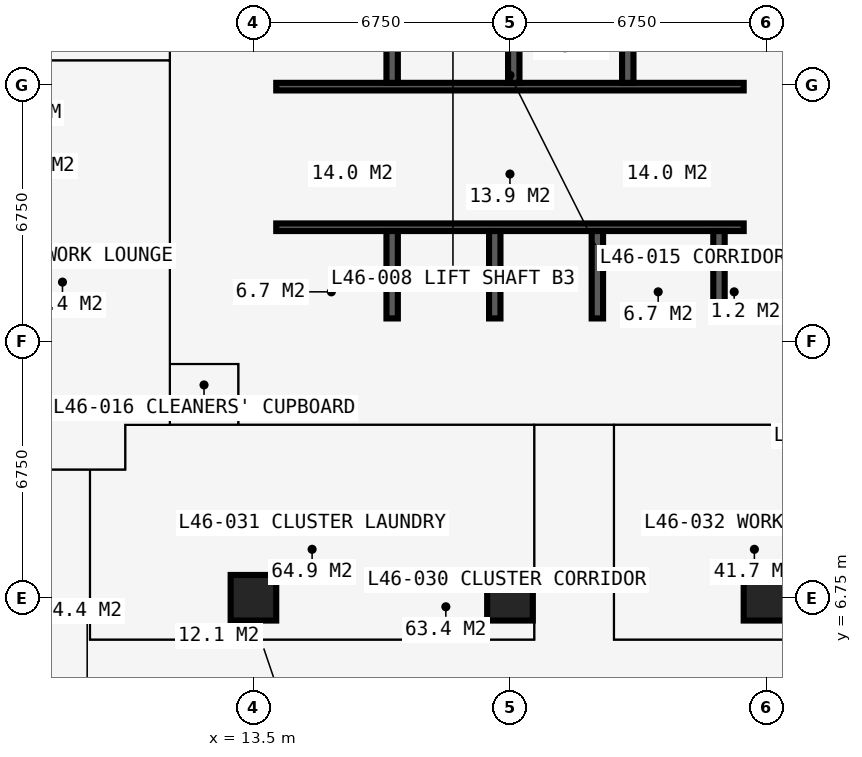
"""IFC4 building model, lengths in metres.
Left out: names, types, materials, properties, quantities, classifications, styles, units other than length and angle.
Written with IfcOpenShell. Run it as: python <this file> out.ifc"""

import sys

from ifc_helpers import new_model, si_unit, direction, frame, frame_2d, origin, origin_2d, place, context, subcontext, project, spatial, rectangle, extrude, element, fill, save


model = new_model("IFC4")
c1 = context("Model", 3, precision=1e-05, world=origin(), true_north=direction((0.0, 1.0)))
c2 = subcontext(c1, "Body", "Model", "MODEL_VIEW")
j1 = project(units=[si_unit("LENGTHUNIT", "METRE"), si_unit("PLANEANGLEUNIT", "RADIAN")], contexts=[c1])
p1 = place(None, origin())
s1 = spatial("IfcSite", under=j1, at=p1, CompositionType="ELEMENT")
p2 = place(p1, origin())
s2 = spatial("IfcBuilding", under=s1, at=p2, CompositionType="ELEMENT")
p3 = place(p2, frame((0.0, 0.0, 171.0)))
s3 = spatial("IfcBuildingStorey", under=s2, at=p3, CompositionType="ELEMENT", Elevation=171.0)
for number, where, z_axis, x_axis in (
    (1, (13.5, 6.75, 0.0), (0.0, 0.0, 1.0), (1.0, 0.0, 0.0)),
    (2, (20.25, 6.75, 0.0), (0.0, 0.0, 1.0), (1.0, 0.0, 0.0)),
    (3, (27.0, 6.75, 0.0), (0.0, 0.0, 1.0), (1.0, 0.0, 0.0)),
):
    element("IfcColumn", number, at=place(p3, frame(where, z_axis=z_axis, x_axis=x_axis)), inside=s3, PredefinedType="COLUMN", context=c2, shape_type="SweptSolid", body=[
        extrude(rectangle(XDim=1.2, YDim=1.2, at=origin_2d()), origin(), (0.0, 0.0, 1.0), 3.6),
    ])
p4 = place(p3, frame((13.1, 13.5, 0.0), z_axis=(0.0, 0.0, 1.0), x_axis=(1.0, 0.0, 0.0)))
e4 = element("IfcWall", 4, at=p4, inside=s3, PredefinedType="SHEAR", context=c2, shape_type="SweptSolid", body=[
    extrude(rectangle(XDim=14.3, YDim=1.2, at=frame_2d((7.15, 0.0))), origin(), (0.0, 0.0, 1.0), 3.6),
])
p5 = place(p3, frame((26.9, 14.1, 0.0), z_axis=(0.0, 0.0, 1.0), x_axis=(0.0, 1.0, 0.0)))
e5 = element("IfcWall", 5, at=p5, inside=s3, PredefinedType="SHEAR", context=c2, shape_type="SweptSolid", body=[
    extrude(rectangle(XDim=12.3, YDim=1.0, at=frame_2d((6.15, 0.0))), origin(), (0.0, 0.0, 1.0), 3.6),
])
p6 = place(p5, frame((3.65, 0.0, 0.0)))
e6 = element("IfcOpeningElement", 6, at=p6, cuts=e5, PredefinedType="OPENING", context=c2, shape_type="SweptSolid", body=[
    extrude(rectangle(XDim=1.2, YDim=2.2, at=frame_2d((0.6, 1.1))), frame((0.0, 0.51, 0.0), z_axis=(0.0, -1.0, 0.0), x_axis=(1.0, 0.0, 0.0)), (0.0, 0.0, 1.0), 1.02),
])
p7 = place(p3, frame((13.6, 26.4, 0.0), z_axis=(0.0, 0.0, 1.0), x_axis=(0.0, -1.0, 0.0)))
e7 = element("IfcWall", 7, at=p7, inside=s3, PredefinedType="SHEAR", context=c2, shape_type="SweptSolid", body=[
    extrude(rectangle(XDim=12.3, YDim=1.0, at=frame_2d((6.15, 0.0))), origin(), (0.0, 0.0, 1.0), 3.6),
])
p8 = place(p7, frame((7.45, 0.0, 0.0)))
e8 = element("IfcOpeningElement", 8, at=p8, cuts=e7, PredefinedType="OPENING", context=c2, shape_type="SweptSolid", body=[
    extrude(rectangle(XDim=1.2, YDim=2.2, at=frame_2d((0.6, 1.1))), frame((0.0, 0.51, 0.0), z_axis=(0.0, -1.0, 0.0), x_axis=(1.0, 0.0, 0.0)), (0.0, 0.0, 1.0), 1.02),
])
p9 = place(p3, frame((14.1, 16.5, 0.0), z_axis=(0.0, 0.0, 1.0), x_axis=(1.0, 0.0, 0.0)))
e9 = element("IfcWall", 9, at=p9, inside=s3, PredefinedType="SHEAR", context=c2, shape_type="SweptSolid", body=[
    extrude(rectangle(XDim=12.3, YDim=0.2, at=frame_2d((6.15, 0.0))), origin(), (0.0, 0.0, 1.0), 3.6),
])
p10 = place(p9, frame((0.9, 0.0, 0.0)))
e10 = element("IfcOpeningElement", 10, at=p10, cuts=e9, PredefinedType="OPENING", context=c2, shape_type="SweptSolid", body=[
    extrude(rectangle(XDim=1.1, YDim=2.2, at=frame_2d((0.55, 1.1))), frame((0.0, 0.11, 0.0), z_axis=(0.0, -1.0, 0.0), x_axis=(1.0, 0.0, 0.0)), (0.0, 0.0, 1.0), 0.22),
])
p11 = place(p9, frame((4.31, 0.0, 0.0)))
e11 = element("IfcOpeningElement", 11, at=p11, cuts=e9, PredefinedType="OPENING", context=c2, shape_type="SweptSolid", body=[
    extrude(rectangle(XDim=1.1, YDim=2.2, at=frame_2d((0.55, 1.1))), frame((0.0, 0.11, 0.0), z_axis=(0.0, -1.0, 0.0), x_axis=(1.0, 0.0, 0.0)), (0.0, 0.0, 1.0), 0.22),
])
p12 = place(p9, frame((6.45, 0.0, 0.0)))
e12 = element("IfcOpeningElement", 12, at=p12, cuts=e9, PredefinedType="OPENING", context=c2, shape_type="SweptSolid", body=[
    extrude(rectangle(XDim=1.1, YDim=2.2, at=frame_2d((0.55, 1.1))), frame((0.0, 0.11, 0.0), z_axis=(0.0, -1.0, 0.0), x_axis=(1.0, 0.0, 0.0)), (0.0, 0.0, 1.0), 0.22),
])
p13 = place(p9, frame((9.5, 0.0, 0.0)))
e13 = element("IfcOpeningElement", 13, at=p13, cuts=e9, PredefinedType="OPENING", context=c2, shape_type="SweptSolid", body=[
    extrude(rectangle(XDim=1.1, YDim=2.2, at=frame_2d((0.55, 1.1))), frame((0.0, 0.11, 0.0), z_axis=(0.0, -1.0, 0.0), x_axis=(1.0, 0.0, 0.0)), (0.0, 0.0, 1.0), 0.22),
])
p14 = place(p3, frame((14.1, 20.2, 0.0), z_axis=(0.0, 0.0, 1.0), x_axis=(1.0, 0.0, 0.0)))
e14 = element("IfcWall", 14, at=p14, inside=s3, PredefinedType="SHEAR", context=c2, shape_type="SweptSolid", body=[
    extrude(rectangle(XDim=12.3, YDim=0.2, at=frame_2d((6.15, 0.0))), origin(), (0.0, 0.0, 1.0), 3.6),
])
p15 = place(p14, frame((4.56, 0.0, 0.0)))
e15 = element("IfcOpeningElement", 15, at=p15, cuts=e14, PredefinedType="OPENING", context=c2, shape_type="SweptSolid", body=[
    extrude(rectangle(XDim=1.1, YDim=2.2, at=frame_2d((0.55, 1.1))), frame((0.0, 0.11, 0.0), z_axis=(0.0, -1.0, 0.0), x_axis=(1.0, 0.0, 0.0)), (0.0, 0.0, 1.0), 0.22),
])
p16 = place(p14, frame((6.7, 0.0, 0.0)))
e16 = element("IfcOpeningElement", 16, at=p16, cuts=e14, PredefinedType="OPENING", context=c2, shape_type="SweptSolid", body=[
    extrude(rectangle(XDim=1.1, YDim=2.2, at=frame_2d((0.55, 1.1))), frame((0.0, 0.11, 0.0), z_axis=(0.0, -1.0, 0.0), x_axis=(1.0, 0.0, 0.0)), (0.0, 0.0, 1.0), 0.22),
])
p17 = place(p14, frame((0.35, 0.0, 0.0)))
e17 = element("IfcOpeningElement", 17, at=p17, cuts=e14, PredefinedType="OPENING", context=c2, shape_type="SweptSolid", body=[
    extrude(rectangle(XDim=1.1, YDim=2.2, at=frame_2d((0.55, 1.1))), frame((0.0, 0.11, 0.0), z_axis=(0.0, -1.0, 0.0), x_axis=(1.0, 0.0, 0.0)), (0.0, 0.0, 1.0), 0.22),
])
p18 = place(p14, frame((9.75, 0.0, 0.0)))
e18 = element("IfcOpeningElement", 18, at=p18, cuts=e14, PredefinedType="OPENING", context=c2, shape_type="SweptSolid", body=[
    extrude(rectangle(XDim=1.1, YDim=2.2, at=frame_2d((0.55, 1.1))), frame((0.0, 0.11, 0.0), z_axis=(0.0, -1.0, 0.0), x_axis=(1.0, 0.0, 0.0)), (0.0, 0.0, 1.0), 0.22),
])
for number, where, z_axis, x_axis in (
    (19, (17.15, 20.3, 0.0), (0.0, 0.0, 1.0), (0.0, 1.0, 0.0)),
    (20, (23.35, 20.3, 0.0), (0.0, 0.0, 1.0), (0.0, 1.0, 0.0)),
):
    element("IfcWall", number, at=place(p3, frame(where, z_axis=z_axis, x_axis=x_axis)), inside=s3, PredefinedType="SHEAR", context=c2, shape_type="SweptSolid", body=[
        extrude(rectangle(XDim=6.1, YDim=0.3, at=frame_2d((3.05, 0.0))), origin(), (0.0, 0.0, 1.0), 3.6),
    ])
p19 = place(p3, frame((20.35, 20.3, 0.0), z_axis=(0.0, 0.0, 1.0), x_axis=(0.0, 1.0, 0.0)))
e21 = element("IfcWall", 21, at=p19, inside=s3, PredefinedType="SHEAR", context=c2, shape_type="SweptSolid", body=[
    extrude(rectangle(XDim=2.8, YDim=0.3, at=frame_2d((1.4, 0.0))), origin(), (0.0, 0.0, 1.0), 3.6),
])
for number, where, z_axis, x_axis in (
    (22, (17.15, 14.1, 0.0), (0.0, 0.0, 1.0), (0.0, 1.0, 0.0)),
    (23, (19.85, 14.1, 0.0), (0.0, 0.0, 1.0), (0.0, 1.0, 0.0)),
    (24, (22.55, 14.1, 0.0), (0.0, 0.0, 1.0), (0.0, 1.0, 0.0)),
    (25, (25.75, 14.1, 0.0), (0.0, 0.0, 1.0), (0.0, 1.0, 0.0)),
):
    element("IfcWall", number, at=place(p3, frame(where, z_axis=z_axis, x_axis=x_axis)), inside=s3, PredefinedType="SHEAR", context=c2, shape_type="SweptSolid", body=[
        extrude(rectangle(XDim=2.3, YDim=0.3, at=frame_2d((1.15, 0.0))), origin(), (0.0, 0.0, 1.0), 3.6),
    ])
p20 = place(p3, frame((18.185, 16.6, 0.0), z_axis=(0.0, 0.0, 1.0), x_axis=(0.0, 1.0, 0.0)))
e26 = element("IfcWall", 26, at=p20, inside=s3, PredefinedType="PARTITIONING", context=c2, shape_type="SweptSolid", body=[
    extrude(rectangle(XDim=3.5, YDim=0.15, at=frame_2d((1.75, 0.0))), origin(), (0.0, 0.0, 1.0), 3.375),
])
p21 = place(p20, frame((1.15, 0.0, 0.0)))
e27 = element("IfcOpeningElement", 27, at=p21, cuts=e26, PredefinedType="OPENING", context=c2, shape_type="SweptSolid", body=[
    extrude(rectangle(XDim=1.2, YDim=2.2, at=frame_2d((0.6, 1.1))), frame((0.0, 0.085, 0.0), z_axis=(0.0, -1.0, 0.0), x_axis=(1.0, 0.0, 0.0)), (0.0, 0.0, 1.0), 0.17),
])
p22 = place(p3, frame((22.315, 16.6, 0.0), z_axis=(0.0, 0.0, 1.0), x_axis=(0.0, 1.0, 0.0)))
e28 = element("IfcWall", 28, at=p22, inside=s3, PredefinedType="PARTITIONING", context=c2, shape_type="SweptSolid", body=[
    extrude(rectangle(XDim=3.5, YDim=0.15, at=frame_2d((1.75, 0.0))), origin(), (0.0, 0.0, 1.0), 3.375),
])
p23 = place(p22, frame((1.15, 0.0, 0.0)))
e29 = element("IfcOpeningElement", 29, at=p23, cuts=e28, PredefinedType="OPENING", context=c2, shape_type="SweptSolid", body=[
    extrude(rectangle(XDim=1.2, YDim=2.2, at=frame_2d((0.6, 1.1))), frame((0.0, 0.085, 0.0), z_axis=(0.0, -1.0, 0.0), x_axis=(1.0, 0.0, 0.0)), (0.0, 0.0, 1.0), 0.17),
])
p24 = place(p3, frame((-0.734, 10.125, 0.0), z_axis=(0.0, 0.0, 1.0), x_axis=(1.0, 0.0, 0.0)))
e30 = element("IfcWall", 30, at=p24, inside=s3, PredefinedType="PARTITIONING", context=c2, shape_type="SweptSolid", body=[
    extrude(rectangle(XDim=10.859, YDim=0.15, at=frame_2d((5.429, 0.0))), origin(), (0.0, 0.0, 1.0), 3.375),
])
p25 = place(p24, frame((8.234, 0.0, 0.0)))
e31 = element("IfcOpeningElement", 31, at=p25, cuts=e30, PredefinedType="OPENING", context=c2, shape_type="SweptSolid", body=[
    extrude(rectangle(XDim=0.95, YDim=2.2, at=frame_2d((0.475, 1.1))), frame((0.0, 0.085, 0.0), z_axis=(0.0, -1.0, 0.0), x_axis=(1.0, 0.0, 0.0)), (0.0, 0.0, 1.0), 0.17),
])
p26 = place(p3, frame((5.65, 20.887, 0.0), z_axis=(0.0, 0.0, 1.0), x_axis=(1.0, 0.0, 0.0)))
e32 = element("IfcWall", 32, at=p26, inside=s3, PredefinedType="PARTITIONING", context=c2, shape_type="SweptSolid", body=[
    extrude(rectangle(XDim=5.65, YDim=0.15, at=frame_2d((2.825, 0.0))), origin(), (0.0, 0.0, 1.0), 3.375),
])
p27 = place(p3, frame((9.2, 5.65, 0.0), z_axis=(0.0, 0.0, 1.0), x_axis=(0.0, 1.0, 0.0)))
e33 = element("IfcWall", 33, at=p27, inside=s3, PredefinedType="PARTITIONING", context=c2, shape_type="SweptSolid", body=[
    extrude(rectangle(XDim=4.475, YDim=0.15, at=frame_2d((2.238, 0.0))), origin(), (0.0, 0.0, 1.0), 3.375),
])
p28 = place(p3, frame((9.2, 5.65, 0.0), z_axis=(0.0, 0.0, 1.0), x_axis=(1.0, 0.0, 0.0)))
e34 = element("IfcWall", 34, at=p28, inside=s3, PredefinedType="PARTITIONING", context=c2, shape_type="SweptSolid", body=[
    extrude(rectangle(XDim=11.688, YDim=0.15, at=frame_2d((5.844, 0.0))), origin(), (0.0, 0.0, 1.0), 3.375),
])
p29 = place(p28, frame((5.35, 0.0, 0.0)))
e35 = element("IfcOpeningElement", 35, at=p29, cuts=e34, PredefinedType="OPENING", context=c2, shape_type="SweptSolid", body=[
    extrude(rectangle(XDim=0.95, YDim=2.2, at=frame_2d((0.475, 1.1))), frame((0.0, 0.085, 0.0), z_axis=(0.0, -1.0, 0.0), x_axis=(1.0, 0.0, 0.0)), (0.0, 0.0, 1.0), 0.17),
])
p30 = place(p3, frame((10.125, 10.125, 0.0), z_axis=(0.0, 0.0, 1.0), x_axis=(0.0, 1.0, 0.0)))
e36 = element("IfcWall", 36, at=p30, inside=s3, PredefinedType="PARTITIONING", context=c2, shape_type="SweptSolid", body=[
    extrude(rectangle(XDim=1.175, YDim=0.15, at=frame_2d((0.587, 0.0))), origin(), (0.0, 0.0, 1.0), 3.375),
])
p31 = place(p3, frame((10.125, 11.3, 0.0), z_axis=(0.0, 0.0, 1.0), x_axis=(1.0, 0.0, 0.0)))
e37 = element("IfcWall", 37, at=p31, inside=s3, PredefinedType="PARTITIONING", context=c2, shape_type="SweptSolid", body=[
    extrude(rectangle(XDim=21.475, YDim=0.15, at=frame_2d((10.738, 0.0))), origin(), (0.0, 0.0, 1.0), 3.375),
])
p32 = place(p31, frame((11.312, 0.0, 0.0)))
e38 = element("IfcOpeningElement", 38, at=p32, cuts=e37, PredefinedType="OPENING", context=c2, shape_type="SweptSolid", body=[
    extrude(rectangle(XDim=1.0, YDim=2.2, at=frame_2d((0.5, 1.1))), frame((0.0, 0.085, 0.0), z_axis=(0.0, -1.0, 0.0), x_axis=(1.0, 0.0, 0.0)), (0.0, 0.0, 1.0), 0.17),
])
p33 = place(p3, frame((11.3, 11.3, 0.0), z_axis=(0.0, 0.0, 1.0), x_axis=(0.0, 1.0, 0.0)))
e39 = element("IfcWall", 39, at=p33, inside=s3, PredefinedType="PARTITIONING", context=c2, shape_type="SweptSolid", body=[
    extrude(rectangle(XDim=19.075, YDim=0.15, at=frame_2d((9.538, 0.0))), origin(), (0.0, 0.0, 1.0), 3.375),
])
p34 = place(p33, frame((13.95, 0.0, 0.0)))
e40 = element("IfcOpeningElement", 40, at=p34, cuts=e39, PredefinedType="OPENING", context=c2, shape_type="SweptSolid", body=[
    extrude(rectangle(XDim=1.0, YDim=2.2, at=frame_2d((0.5, 1.1))), frame((0.0, 0.085, 0.0), z_axis=(0.0, -1.0, 0.0), x_axis=(1.0, 0.0, 0.0)), (0.0, 0.0, 1.0), 0.17),
])
p35 = place(p3, frame((11.3, 12.9, 0.0), z_axis=(0.0, 0.0, 1.0), x_axis=(1.0, 0.0, 0.0)))
e41 = element("IfcWall", 41, at=p35, inside=s3, PredefinedType="PARTITIONING", context=c2, shape_type="SweptSolid", body=[
    extrude(rectangle(XDim=1.8, YDim=0.15, at=frame_2d((0.9, 0.0))), origin(), (0.0, 0.0, 1.0), 2.806),
])
p36 = place(p35, frame((0.4, 0.0, 0.0)))
e42 = element("IfcOpeningElement", 42, at=p36, cuts=e41, PredefinedType="OPENING", context=c2, shape_type="SweptSolid", body=[
    extrude(rectangle(XDim=0.95, YDim=2.2, at=frame_2d((0.475, 1.1))), frame((0.0, 0.085, 0.0), z_axis=(0.0, -1.0, 0.0), x_axis=(1.0, 0.0, 0.0)), (0.0, 0.0, 1.0), 0.17),
])
p37 = place(p3, frame((13.1, 11.3, 0.0), z_axis=(0.0, 0.0, 1.0), x_axis=(0.0, 1.0, 0.0)))
e43 = element("IfcWall", 43, at=p37, inside=s3, PredefinedType="PARTITIONING", context=c2, shape_type="SweptSolid", body=[
    extrude(rectangle(XDim=1.6, YDim=0.15, at=frame_2d((0.8, 0.0))), origin(), (0.0, 0.0, 1.0), 3.375),
])
p38 = place(p3, frame((20.887, 5.65, 0.0), z_axis=(0.0, 0.0, 1.0), x_axis=(0.0, 1.0, 0.0)))
e44 = element("IfcWall", 44, at=p38, inside=s3, PredefinedType="PARTITIONING", context=c2, shape_type="SweptSolid", body=[
    extrude(rectangle(XDim=5.65, YDim=0.15, at=frame_2d((2.825, 0.0))), origin(), (0.0, 0.0, 1.0), 3.375),
])
p39 = place(p3, frame((22.988, 5.65, 0.0), z_axis=(0.0, 0.0, 1.0), x_axis=(1.0, 0.0, 0.0)))
e45 = element("IfcWall", 45, at=p39, inside=s3, PredefinedType="PARTITIONING", context=c2, shape_type="SweptSolid", body=[
    extrude(rectangle(XDim=7.387, YDim=0.15, at=frame_2d((3.694, 0.0))), origin(), (0.0, 0.0, 1.0), 3.375),
])
p40 = place(p39, frame((2.45, 0.0, 0.0)))
e46 = element("IfcOpeningElement", 46, at=p40, cuts=e45, PredefinedType="OPENING", context=c2, shape_type="SweptSolid", body=[
    extrude(rectangle(XDim=0.95, YDim=2.2, at=frame_2d((0.475, 1.1))), frame((0.0, 0.085, 0.0), z_axis=(0.0, -1.0, 0.0), x_axis=(1.0, 0.0, 0.0)), (0.0, 0.0, 1.0), 0.17),
])
p41 = place(p3, frame((22.988, 5.65, 0.0), z_axis=(0.0, 0.0, 1.0), x_axis=(0.0, 1.0, 0.0)))
e47 = element("IfcWall", 47, at=p41, inside=s3, PredefinedType="PARTITIONING", context=c2, shape_type="SweptSolid", body=[
    extrude(rectangle(XDim=5.65, YDim=0.15, at=frame_2d((2.825, 0.0))), origin(), (0.0, 0.0, 1.0), 3.375),
])
p42 = place(p10, origin())
e48 = element("IfcDoor", 48, at=p42, inside=s3, OperationType="DOUBLE_DOOR_SLIDING", PredefinedType="DOOR", context=c2, shape_type="SweptSolid", body=[
    extrude(rectangle(XDim=1.1, YDim=2.2, at=frame_2d((0.55, 1.1))), frame((0.0, 0.025, 0.0), z_axis=(0.0, -1.0, 0.0), x_axis=(1.0, 0.0, 0.0)), (0.0, 0.0, 1.0), 0.05),
])
fill(e10, e48)
p43 = place(p11, origin())
e49 = element("IfcDoor", 49, at=p43, inside=s3, OperationType="DOUBLE_DOOR_SLIDING", PredefinedType="DOOR", context=c2, shape_type="SweptSolid", body=[
    extrude(rectangle(XDim=1.1, YDim=2.2, at=frame_2d((0.55, 1.1))), frame((0.0, 0.025, 0.0), z_axis=(0.0, -1.0, 0.0), x_axis=(1.0, 0.0, 0.0)), (0.0, 0.0, 1.0), 0.05),
])
fill(e11, e49)
p44 = place(p12, origin())
e50 = element("IfcDoor", 50, at=p44, inside=s3, OperationType="DOUBLE_DOOR_SLIDING", PredefinedType="DOOR", context=c2, shape_type="SweptSolid", body=[
    extrude(rectangle(XDim=1.1, YDim=2.2, at=frame_2d((0.55, 1.1))), frame((0.0, 0.025, 0.0), z_axis=(0.0, -1.0, 0.0), x_axis=(1.0, 0.0, 0.0)), (0.0, 0.0, 1.0), 0.05),
])
fill(e12, e50)
p45 = place(p13, origin())
e51 = element("IfcDoor", 51, at=p45, inside=s3, OperationType="DOUBLE_DOOR_SLIDING", PredefinedType="DOOR", context=c2, shape_type="SweptSolid", body=[
    extrude(rectangle(XDim=1.1, YDim=2.2, at=frame_2d((0.55, 1.1))), frame((0.0, 0.025, 0.0), z_axis=(0.0, -1.0, 0.0), x_axis=(1.0, 0.0, 0.0)), (0.0, 0.0, 1.0), 0.05),
])
fill(e13, e51)
p46 = place(p15, origin())
e52 = element("IfcDoor", 52, at=p46, inside=s3, OperationType="DOUBLE_DOOR_SLIDING", PredefinedType="DOOR", context=c2, shape_type="SweptSolid", body=[
    extrude(rectangle(XDim=1.1, YDim=2.2, at=frame_2d((0.55, 1.1))), frame((0.0, 0.025, 0.0), z_axis=(0.0, -1.0, 0.0), x_axis=(1.0, 0.0, 0.0)), (0.0, 0.0, 1.0), 0.05),
])
fill(e15, e52)
p47 = place(p16, origin())
e53 = element("IfcDoor", 53, at=p47, inside=s3, OperationType="DOUBLE_DOOR_SLIDING", PredefinedType="DOOR", context=c2, shape_type="SweptSolid", body=[
    extrude(rectangle(XDim=1.1, YDim=2.2, at=frame_2d((0.55, 1.1))), frame((0.0, 0.025, 0.0), z_axis=(0.0, -1.0, 0.0), x_axis=(1.0, 0.0, 0.0)), (0.0, 0.0, 1.0), 0.05),
])
fill(e16, e53)
p48 = place(p8, origin())
e54 = element("IfcDoor", 54, at=p48, inside=s3, OperationType="DOUBLE_DOOR_SINGLE_SWING", PredefinedType="DOOR", context=c2, shape_type="SweptSolid", body=[
    extrude(rectangle(XDim=1.2, YDim=2.2, at=frame_2d((0.6, 1.1))), frame((0.0, 0.025, 0.0), z_axis=(0.0, -1.0, 0.0), x_axis=(1.0, 0.0, 0.0)), (0.0, 0.0, 1.0), 0.05),
])
fill(e8, e54)
p49 = place(p6, origin())
e55 = element("IfcDoor", 55, at=p49, inside=s3, OperationType="DOUBLE_DOOR_SINGLE_SWING", PredefinedType="DOOR", context=c2, shape_type="SweptSolid", body=[
    extrude(rectangle(XDim=1.2, YDim=2.2, at=frame_2d((0.6, 1.1))), frame((0.0, 0.025, 0.0), z_axis=(0.0, -1.0, 0.0), x_axis=(1.0, 0.0, 0.0)), (0.0, 0.0, 1.0), 0.05),
])
fill(e6, e55)
p50 = place(p21, origin())
e56 = element("IfcDoor", 56, at=p50, inside=s3, OperationType="DOUBLE_DOOR_SINGLE_SWING", PredefinedType="DOOR", context=c2, shape_type="SweptSolid", body=[
    extrude(rectangle(XDim=1.2, YDim=2.2, at=frame_2d((0.6, 1.1))), frame((0.0, 0.025, 0.0), z_axis=(0.0, -1.0, 0.0), x_axis=(1.0, 0.0, 0.0)), (0.0, 0.0, 1.0), 0.05),
])
fill(e27, e56)
p51 = place(p23, origin())
e57 = element("IfcDoor", 57, at=p51, inside=s3, OperationType="DOUBLE_DOOR_SINGLE_SWING", PredefinedType="DOOR", context=c2, shape_type="SweptSolid", body=[
    extrude(rectangle(XDim=1.2, YDim=2.2, at=frame_2d((0.6, 1.1))), frame((0.0, 0.025, 0.0), z_axis=(0.0, -1.0, 0.0), x_axis=(1.0, 0.0, 0.0)), (0.0, 0.0, 1.0), 0.05),
])
fill(e29, e57)
p52 = place(p17, origin())
e58 = element("IfcDoor", 58, at=p52, inside=s3, OperationType="SINGLE_SWING_LEFT", PredefinedType="DOOR", context=c2, shape_type="SweptSolid", body=[
    extrude(rectangle(XDim=1.1, YDim=2.2, at=frame_2d((0.55, 1.1))), frame((0.0, 0.025, 0.0), z_axis=(0.0, -1.0, 0.0), x_axis=(1.0, 0.0, 0.0)), (0.0, 0.0, 1.0), 0.05),
])
fill(e17, e58)
p53 = place(p18, origin())
e59 = element("IfcDoor", 59, at=p53, inside=s3, OperationType="SINGLE_SWING_LEFT", PredefinedType="DOOR", context=c2, shape_type="SweptSolid", body=[
    extrude(rectangle(XDim=1.1, YDim=2.2, at=frame_2d((0.55, 1.1))), frame((0.0, 0.025, 0.0), z_axis=(0.0, -1.0, 0.0), x_axis=(1.0, 0.0, 0.0)), (0.0, 0.0, 1.0), 0.05),
])
fill(e18, e59)
p54 = place(p36, origin())
e60 = element("IfcDoor", 60, at=p54, inside=s3, OperationType="SINGLE_SWING_LEFT", PredefinedType="DOOR", context=c2, shape_type="SweptSolid", body=[
    extrude(rectangle(XDim=0.95, YDim=2.2, at=frame_2d((0.475, 1.1))), frame((0.0, 0.025, 0.0), z_axis=(0.0, -1.0, 0.0), x_axis=(1.0, 0.0, 0.0)), (0.0, 0.0, 1.0), 0.05),
])
fill(e42, e60)
p55 = place(p32, origin())
e61 = element("IfcDoor", 61, at=p55, inside=s3, OperationType="SINGLE_SWING_LEFT", PredefinedType="DOOR", context=c2, shape_type="SweptSolid", body=[
    extrude(rectangle(XDim=1.0, YDim=2.2, at=frame_2d((0.5, 1.1))), frame((0.0, 0.025, 0.0), z_axis=(0.0, -1.0, 0.0), x_axis=(1.0, 0.0, 0.0)), (0.0, 0.0, 1.0), 0.05),
])
fill(e38, e61)
p56 = place(p29, origin())
e62 = element("IfcDoor", 62, at=p56, inside=s3, OperationType="SINGLE_SWING_LEFT", PredefinedType="DOOR", context=c2, shape_type="SweptSolid", body=[
    extrude(rectangle(XDim=0.95, YDim=2.2, at=frame_2d((0.475, 1.1))), frame((0.0, 0.025, 0.0), z_axis=(0.0, -1.0, 0.0), x_axis=(1.0, 0.0, 0.0)), (0.0, 0.0, 1.0), 0.05),
])
fill(e35, e62)
p57 = place(p40, origin())
e63 = element("IfcDoor", 63, at=p57, inside=s3, OperationType="SINGLE_SWING_LEFT", PredefinedType="DOOR", context=c2, shape_type="SweptSolid", body=[
    extrude(rectangle(XDim=0.95, YDim=2.2, at=frame_2d((0.475, 1.1))), frame((0.0, 0.025, 0.0), z_axis=(0.0, -1.0, 0.0), x_axis=(1.0, 0.0, 0.0)), (0.0, 0.0, 1.0), 0.05),
])
fill(e46, e63)
p58 = place(p25, origin())
e64 = element("IfcDoor", 64, at=p58, inside=s3, OperationType="SINGLE_SWING_LEFT", PredefinedType="DOOR", context=c2, shape_type="SweptSolid", body=[
    extrude(rectangle(XDim=0.95, YDim=2.2, at=frame_2d((0.475, 1.1))), frame((0.0, 0.025, 0.0), z_axis=(0.0, -1.0, 0.0), x_axis=(1.0, 0.0, 0.0)), (0.0, 0.0, 1.0), 0.05),
])
fill(e31, e64)
save(model, sys.argv[1])
